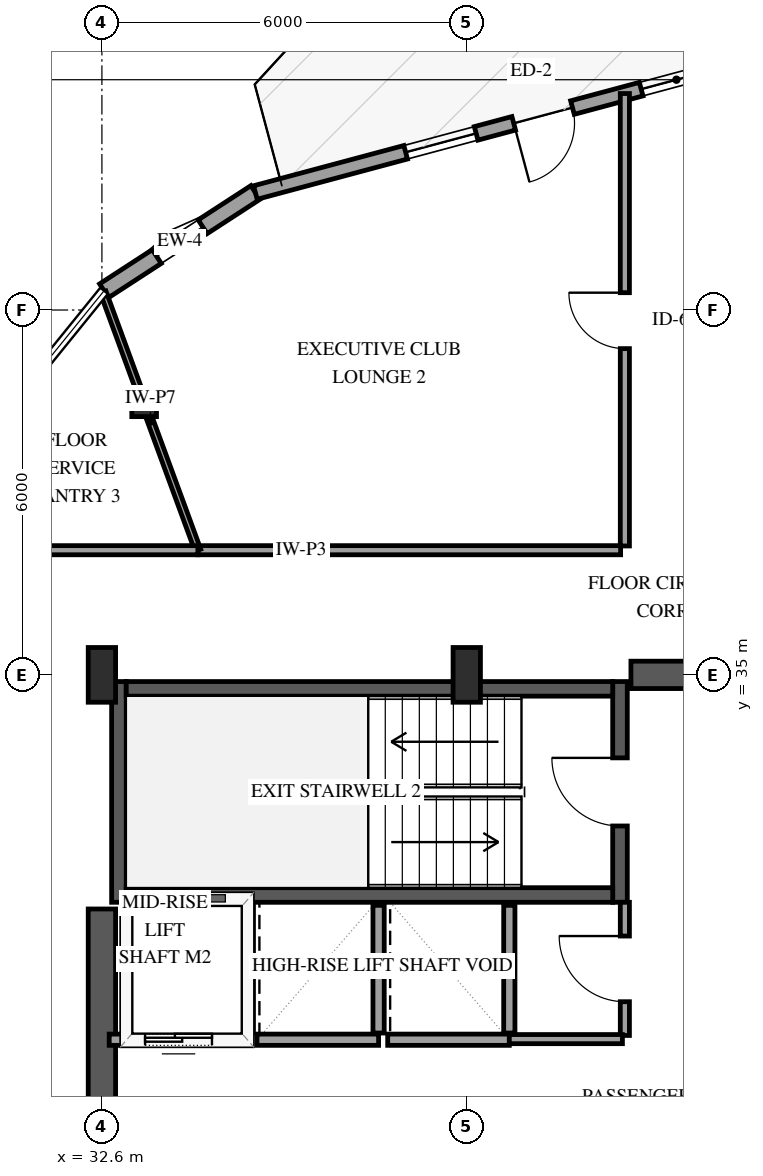
"""IFC4 building model, lengths in metres.
Left out: names, types, materials, properties, quantities, classifications, styles, units other than length and angle.
Written with IfcOpenShell. Run it as: python <this file> out.ifc"""

import sys

from ifc_helpers import new_model, si_unit, direction, frame, frame_2d, origin, origin_2d, place, context, subcontext, project, spatial, rectangle, i_section, extrude, element, fill, save


model = new_model("IFC4")
c1 = context("Model", 3, precision=1e-05, world=origin(), true_north=direction((0.0, 1.0)))
c2 = subcontext(c1, "Body", "Model", "MODEL_VIEW")
j1 = project(units=[si_unit("LENGTHUNIT", "METRE"), si_unit("PLANEANGLEUNIT", "RADIAN")], contexts=[c1])
p1 = place(None, origin())
s1 = spatial("IfcSite", under=j1, at=p1, CompositionType="ELEMENT")
p2 = place(p1, origin())
s2 = spatial("IfcBuilding", under=s1, at=p2, CompositionType="ELEMENT")
p3 = place(p2, frame((0.0, 0.0, 219.4)))
s3 = spatial("IfcBuildingStorey", under=s2, at=p3, CompositionType="ELEMENT", Elevation=219.4)
p4 = place(p3, frame((32.88, 31.26, 0.0), z_axis=(0.0, 0.0, 1.0), x_axis=(0.0, 1.0, 0.0)))
e1 = element("IfcWall", 1, at=p4, inside=s3, PredefinedType="SHEAR", context=c2, shape_type="SweptSolid", body=[
    extrude(rectangle(XDim=3.63, YDim=0.24, at=frame_2d((1.815, 0.0))), origin(), (0.0, 0.0, 1.0), 3.6),
])
p5 = place(p3, frame((41.12, 31.26, 0.0), z_axis=(0.0, 0.0, 1.0), x_axis=(0.0, 1.0, 0.0)))
e2 = element("IfcWall", 2, at=p5, inside=s3, PredefinedType="SHEAR", context=c2, shape_type="SweptSolid", body=[
    extrude(rectangle(XDim=3.63, YDim=0.24, at=frame_2d((1.815, 0.0))), origin(), (0.0, 0.0, 1.0), 3.6),
])
p6 = place(p5, frame((1.255, 0.0, 0.0)))
e3 = element("IfcOpeningElement", 3, at=p6, cuts=e2, PredefinedType="OPENING", context=c2, shape_type="SweptSolid", body=[
    extrude(rectangle(XDim=1.12, YDim=2.15, at=frame_2d((0.56, 1.075))), frame((0.0, 0.13, 0.0), z_axis=(0.0, -1.0, 0.0), x_axis=(1.0, 0.0, 0.0)), (0.0, 0.0, 1.0), 0.26),
])
for number, where, z_axis, x_axis in (
    (4, (33.0, 31.38, 0.0), (0.0, 0.0, 1.0), (1.0, 0.0, 0.0)),
    (5, (33.0, 34.77, 0.0), (0.0, 0.0, 1.0), (1.0, 0.0, 0.0)),
):
    element("IfcWall", number, at=place(p3, frame(where, z_axis=z_axis, x_axis=x_axis)), inside=s3, PredefinedType="SHEAR", context=c2, shape_type="SweptSolid", body=[
        extrude(rectangle(XDim=8.0, YDim=0.24, at=frame_2d((4.0, 0.0))), origin(), (0.0, 0.0, 1.0), 3.6),
    ])
p7 = place(p3, frame((32.6, 18.85, 0.0), z_axis=(0.0, 0.0, 1.0), x_axis=(0.0, 1.0, 0.0)))
e6 = element("IfcWall", 6, at=p7, inside=s3, PredefinedType="SHEAR", context=c2, shape_type="SweptSolid", body=[
    extrude(rectangle(XDim=12.3, YDim=0.45, at=frame_2d((6.15, 0.0))), origin(), (0.0, 0.0, 1.0), 3.6),
])
p8 = place(p3, frame((41.3, 35.0, 0.0), z_axis=(0.0, 0.0, 1.0), x_axis=(1.0, 0.0, 0.0)))
e7 = element("IfcWall", 7, at=p8, inside=s3, PredefinedType="SHEAR", context=c2, shape_type="SweptSolid", body=[
    extrude(rectangle(XDim=2.85, YDim=0.45, at=frame_2d((1.425, 0.0))), origin(), (0.0, 0.0, 1.0), 3.6),
])
for number, where, z_axis, x_axis in (
    (8, (32.6, 35.0, 0.0), (0.0, 0.0, 1.0), (1.0, 0.0, 0.0)),
    (9, (38.6, 35.0, 0.0), (0.0, 0.0, 1.0), (1.0, 0.0, 0.0)),
):
    element("IfcColumn", number, at=place(p3, frame(where, z_axis=z_axis, x_axis=x_axis)), inside=s3, PredefinedType="PILASTER", context=c2, shape_type="SweptSolid", body=[
        extrude(rectangle(XDim=0.45, YDim=0.9, at=origin_2d()), origin(), (0.0, 0.0, 1.0), 3.6),
    ])
p9 = place(p3, frame((33.295, 39.455, 0.0), z_axis=(0.0, 0.0, 1.0), x_axis=(1.0, 0.0, 0.0)))
e10 = element("IfcColumn", 10, at=p9, inside=s3, PredefinedType="COLUMN", context=c2, shape_type="SweptSolid", body=[
    extrude(i_section(OverallWidth=0.406, OverallDepth=0.416, WebThickness=0.03, FlangeThickness=0.048, FilletRadius=0.038, at=origin_2d()), origin(), (0.0, 0.0, 1.0), 3.6),
])
p10 = place(p3, frame((35.124, 42.932, 0.0), z_axis=(0.0, 0.0, 1.0), x_axis=(-0.838674807451, -0.544632506693, 0.0)))
e11 = element("IfcWall", 11, at=p10, inside=s3, PredefinedType="SOLIDWALL", context=c2, shape_type="SweptSolid", body=[
    extrude(rectangle(XDim=2.967, YDim=0.27, at=frame_2d((1.483, 0.0))), origin(), (0.0, 0.0, 1.0), 2.679),
])
p11 = place(p10, frame((1.033, 0.0, 0.75)))
e12 = element("IfcOpeningElement", 12, at=p11, cuts=e11, PredefinedType="OPENING", context=c2, shape_type="SweptSolid", body=[
    extrude(rectangle(XDim=0.9, YDim=1.5, at=frame_2d((0.45, 0.75))), frame((0.0, 0.145, 0.0), z_axis=(0.0, -1.0, 0.0), x_axis=(1.0, 0.0, 0.0)), (0.0, 0.0, 1.0), 0.29),
])
p12 = place(p3, frame((44.587, 45.468, 0.0), z_axis=(0.0, 0.0, 1.0), x_axis=(-0.965924471327, -0.258824101839, 0.0)))
e13 = element("IfcWall", 13, at=p12, inside=s3, PredefinedType="SOLIDWALL", context=c2, shape_type="SweptSolid", body=[
    extrude(rectangle(XDim=9.798, YDim=0.23, at=frame_2d((4.899, 0.0))), origin(), (0.0, 0.0, 1.0), 2.679),
])
p13 = place(p12, frame((4.399, 0.0, 0.0)))
e14 = element("IfcOpeningElement", 14, at=p13, cuts=e13, PredefinedType="OPENING", context=c2, shape_type="SweptSolid", body=[
    extrude(rectangle(XDim=1.0, YDim=2.15, at=frame_2d((0.5, 1.075))), frame((0.0, 0.125, 0.0), z_axis=(0.0, -1.0, 0.0), x_axis=(1.0, 0.0, 0.0)), (0.0, 0.0, 1.0), 0.25),
])
p14 = place(p12, frame((2.029, 0.0, 0.72)))
e15 = element("IfcOpeningElement", 15, at=p14, cuts=e13, PredefinedType="OPENING", context=c2, shape_type="SweptSolid", body=[
    extrude(rectangle(XDim=1.2, YDim=1.6, at=frame_2d((0.6, 0.8))), frame((0.0, 0.125, 0.0), z_axis=(0.0, -1.0, 0.0), x_axis=(1.0, 0.0, 0.0)), (0.0, 0.0, 1.0), 0.25),
])
p15 = place(p12, frame((6.039, 0.0, 0.72)))
e16 = element("IfcOpeningElement", 16, at=p15, cuts=e13, PredefinedType="OPENING", context=c2, shape_type="SweptSolid", body=[
    extrude(rectangle(XDim=1.2, YDim=1.6, at=frame_2d((0.6, 0.8))), frame((0.0, 0.125, 0.0), z_axis=(0.0, -1.0, 0.0), x_axis=(1.0, 0.0, 0.0)), (0.0, 0.0, 1.0), 0.25),
])
p16 = place(p3, frame((32.72, 29.0, 0.0), z_axis=(0.0, 0.0, 1.0), x_axis=(1.0, 0.0, 0.0)))
e17 = element("IfcWall", 17, at=p16, inside=s3, PredefinedType="SOLIDWALL", context=c2, shape_type="SweptSolid", body=[
    extrude(rectangle(XDim=2.28, YDim=0.185, at=frame_2d((1.14, 0.0))), origin(), (0.0, 0.0, 1.0), 3.3),
])
p17 = place(p16, frame((0.59, 0.0, 0.0)))
e18 = element("IfcOpeningElement", 18, at=p17, cuts=e17, PredefinedType="OPENING", context=c2, shape_type="SweptSolid", body=[
    extrude(rectangle(XDim=1.1, YDim=2.15, at=frame_2d((0.55, 1.075))), frame((0.0, 0.103, 0.0), z_axis=(0.0, -1.0, 0.0), x_axis=(1.0, 0.0, 0.0)), (0.0, 0.0, 1.0), 0.205),
])
p18 = place(p3, frame((35.0, 29.11, 0.0), z_axis=(0.0, 0.0, 1.0), x_axis=(0.0, 1.0, 0.0)))
e19 = element("IfcWall", 19, at=p18, inside=s3, PredefinedType="SOLIDWALL", context=c2, shape_type="SweptSolid", body=[
    extrude(rectangle(XDim=2.1, YDim=0.185, at=frame_2d((1.05, 0.0))), origin(), (0.0, 0.0, 1.0), 3.3),
])
p19 = place(p3, frame((35.15, 29.0, 0.0), z_axis=(0.0, 0.0, 1.0), x_axis=(1.0, 0.0, 0.0)))
e20 = element("IfcWall", 20, at=p19, inside=s3, PredefinedType="SOLIDWALL", context=c2, shape_type="SweptSolid", body=[
    extrude(rectangle(XDim=2.0, YDim=0.185, at=frame_2d((1.0, 0.0))), origin(), (0.0, 0.0, 1.0), 3.3),
])
p20 = place(p3, frame((37.15, 29.11, 0.0), z_axis=(0.0, 0.0, 1.0), x_axis=(0.0, 1.0, 0.0)))
e21 = element("IfcWall", 21, at=p20, inside=s3, PredefinedType="SOLIDWALL", context=c2, shape_type="SweptSolid", body=[
    extrude(rectangle(XDim=2.1, YDim=0.185, at=frame_2d((1.05, 0.0))), origin(), (0.0, 0.0, 1.0), 3.3),
])
p21 = place(p3, frame((37.3, 29.0, 0.0), z_axis=(0.0, 0.0, 1.0), x_axis=(1.0, 0.0, 0.0)))
e22 = element("IfcWall", 22, at=p21, inside=s3, PredefinedType="SOLIDWALL", context=c2, shape_type="SweptSolid", body=[
    extrude(rectangle(XDim=2.0, YDim=0.185, at=frame_2d((1.0, 0.0))), origin(), (0.0, 0.0, 1.0), 3.3),
])
p22 = place(p3, frame((39.3, 29.11, 0.0), z_axis=(0.0, 0.0, 1.0), x_axis=(0.0, 1.0, 0.0)))
e23 = element("IfcWall", 23, at=p22, inside=s3, PredefinedType="SOLIDWALL", context=c2, shape_type="SweptSolid", body=[
    extrude(rectangle(XDim=2.1, YDim=0.185, at=frame_2d((1.05, 0.0))), origin(), (0.0, 0.0, 1.0), 3.3),
])
p23 = place(p3, frame((41.2, 37.12, 0.0), z_axis=(0.0, 0.0, 1.0), x_axis=(0.0, 1.0, 0.0)))
e24 = element("IfcWall", 24, at=p23, inside=s3, PredefinedType="PARTITIONING", context=c2, shape_type="SweptSolid", body=[
    extrude(rectangle(XDim=7.44, YDim=0.15, at=frame_2d((3.72, 0.0))), origin(), (0.0, 0.0, 1.0), 3.3),
])
p24 = place(p23, frame((3.245, 0.0, 0.0)))
e25 = element("IfcOpeningElement", 25, at=p24, cuts=e24, PredefinedType="OPENING", context=c2, shape_type="SweptSolid", body=[
    extrude(rectangle(XDim=0.92, YDim=2.12, at=frame_2d((0.46, 1.06))), frame((0.0, 0.085, 0.0), z_axis=(0.0, -1.0, 0.0), x_axis=(1.0, 0.0, 0.0)), (0.0, 0.0, 1.0), 0.17),
])
p25 = place(p3, frame((34.178, 37.05, 0.0), z_axis=(0.0, 0.0, 1.0), x_axis=(1.0, 0.0, 0.0)))
e26 = element("IfcWall", 26, at=p25, inside=s3, PredefinedType="PARTITIONING", context=c2, shape_type="SweptSolid", body=[
    extrude(rectangle(XDim=6.952, YDim=0.15, at=frame_2d((3.476, 0.0))), origin(), (0.0, 0.0, 1.0), 3.3),
])
p26 = place(p3, frame((34.178, 37.05, 0.0), z_axis=(0.0, 0.0, 1.0), x_axis=(-0.344697105997, 0.938713963419, 0.0)))
e27 = element("IfcWall", 27, at=p26, inside=s3, PredefinedType="PARTITIONING", context=c2, shape_type="SweptSolid", body=[
    extrude(rectangle(XDim=4.523, YDim=0.1, at=frame_2d((2.261, 0.0))), origin(), (0.0, 0.0, 1.0), 2.595),
])
p27 = place(p3, frame((30.62, 37.05, 0.0), z_axis=(0.0, 0.0, 1.0), x_axis=(1.0, 0.0, 0.0)))
e28 = element("IfcWall", 28, at=p27, inside=s3, PredefinedType="PARTITIONING", context=c2, shape_type="SweptSolid", body=[
    extrude(rectangle(XDim=3.558, YDim=0.15, at=frame_2d((1.779, 0.0))), origin(), (0.0, 0.0, 1.0), 3.3),
])
p28 = place(p3, frame((41.2, 29.07, 0.0), z_axis=(0.0, 0.0, 1.0), x_axis=(0.0, 1.0, 0.0)))
e29 = element("IfcWall", 29, at=p28, inside=s3, PredefinedType="PARTITIONING", context=c2, shape_type="SweptSolid", body=[
    extrude(rectangle(XDim=2.19, YDim=0.15, at=frame_2d((1.095, 0.0))), origin(), (0.0, 0.0, 1.0), 3.3),
])
p29 = place(p28, frame((0.555, 0.0, 0.0)))
e30 = element("IfcOpeningElement", 30, at=p29, cuts=e29, PredefinedType="OPENING", context=c2, shape_type="SweptSolid", body=[
    extrude(rectangle(XDim=1.08, YDim=2.15, at=frame_2d((0.54, 1.075))), frame((0.0, 0.085, 0.0), z_axis=(0.0, -1.0, 0.0), x_axis=(1.0, 0.0, 0.0)), (0.0, 0.0, 1.0), 0.17),
])
p30 = place(p3, frame((39.3, 29.01, 0.0), z_axis=(0.0, 0.0, 1.0), x_axis=(1.0, 0.0, 0.0)))
e31 = element("IfcWall", 31, at=p30, inside=s3, PredefinedType="PARTITIONING", context=c2, shape_type="SweptSolid", body=[
    extrude(rectangle(XDim=1.86, YDim=0.15, at=frame_2d((0.93, 0.0))), origin(), (0.0, 0.0, 1.0), 3.3),
])
p31 = place(p11, origin())
e32 = element("IfcWindow", 32, at=p31, inside=s3, PartitioningType="SINGLE_PANEL", PredefinedType="WINDOW", context=c2, shape_type="SweptSolid", body=[
    extrude(rectangle(XDim=0.9, YDim=1.5, at=frame_2d((0.45, 0.75))), frame((0.0, 0.03, 0.0), z_axis=(0.0, -1.0, 0.0), x_axis=(1.0, 0.0, 0.0)), (0.0, 0.0, 1.0), 0.06),
])
fill(e12, e32)
p32 = place(p13, origin())
e33 = element("IfcDoor", 33, at=p32, inside=s3, OperationType="SINGLE_SWING_RIGHT", PredefinedType="DOOR", context=c2, shape_type="SweptSolid", body=[
    extrude(rectangle(XDim=1.0, YDim=2.15, at=frame_2d((0.5, 1.075))), frame((0.0, 0.025, 0.0), z_axis=(0.0, -1.0, 0.0), x_axis=(1.0, 0.0, 0.0)), (0.0, 0.0, 1.0), 0.05),
])
fill(e14, e33)
p33 = place(p14, origin())
e34 = element("IfcWindow", 34, at=p33, inside=s3, PartitioningType="SINGLE_PANEL", PredefinedType="WINDOW", context=c2, shape_type="SweptSolid", body=[
    extrude(rectangle(XDim=1.2, YDim=1.6, at=frame_2d((0.6, 0.8))), frame((0.0, 0.03, 0.0), z_axis=(0.0, -1.0, 0.0), x_axis=(1.0, 0.0, 0.0)), (0.0, 0.0, 1.0), 0.06),
])
fill(e15, e34)
p34 = place(p15, origin())
e35 = element("IfcWindow", 35, at=p34, inside=s3, PartitioningType="SINGLE_PANEL", PredefinedType="WINDOW", context=c2, shape_type="SweptSolid", body=[
    extrude(rectangle(XDim=1.2, YDim=1.6, at=frame_2d((0.6, 0.8))), frame((0.0, 0.03, 0.0), z_axis=(0.0, -1.0, 0.0), x_axis=(1.0, 0.0, 0.0)), (0.0, 0.0, 1.0), 0.06),
])
fill(e16, e35)
p35 = place(p17, origin())
e36 = element("IfcDoor", 36, at=p35, inside=s3, OperationType="SLIDING_TO_LEFT", PredefinedType="DOOR", context=c2, shape_type="SweptSolid", body=[
    extrude(rectangle(XDim=1.1, YDim=2.15, at=frame_2d((0.55, 1.075))), frame((0.0, 0.025, 0.0), z_axis=(0.0, -1.0, 0.0), x_axis=(1.0, 0.0, 0.0)), (0.0, 0.0, 1.0), 0.05),
])
fill(e18, e36)
p36 = place(p6, origin())
e37 = element("IfcDoor", 37, at=p36, inside=s3, OperationType="SINGLE_SWING_RIGHT", PredefinedType="DOOR", context=c2, shape_type="SweptSolid", body=[
    extrude(rectangle(XDim=1.12, YDim=2.15, at=frame_2d((0.56, 1.075))), frame((0.0, 0.025, 0.0), z_axis=(0.0, -1.0, 0.0), x_axis=(1.0, 0.0, 0.0)), (0.0, 0.0, 1.0), 0.05),
])
fill(e3, e37)
p37 = place(p24, origin())
e38 = element("IfcDoor", 38, at=p37, inside=s3, OperationType="SINGLE_SWING_RIGHT", PredefinedType="DOOR", context=c2, shape_type="SweptSolid", body=[
    extrude(rectangle(XDim=0.92, YDim=2.12, at=frame_2d((0.46, 1.06))), frame((0.0, 0.025, 0.0), z_axis=(0.0, -1.0, 0.0), x_axis=(1.0, 0.0, 0.0)), (0.0, 0.0, 1.0), 0.05),
])
fill(e25, e38)
p38 = place(p29, origin())
e39 = element("IfcDoor", 39, at=p38, inside=s3, OperationType="SINGLE_SWING_RIGHT", PredefinedType="DOOR", context=c2, shape_type="SweptSolid", body=[
    extrude(rectangle(XDim=1.08, YDim=2.15, at=frame_2d((0.54, 1.075))), frame((0.0, 0.025, 0.0), z_axis=(0.0, -1.0, 0.0), x_axis=(1.0, 0.0, 0.0)), (0.0, 0.0, 1.0), 0.05),
])
fill(e30, e39)
save(model, sys.argv[1])
